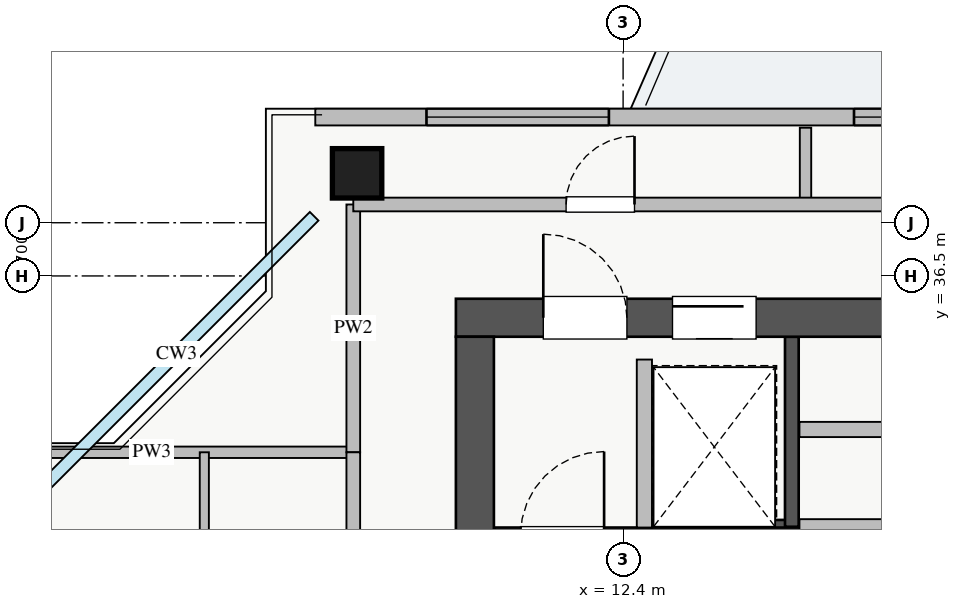
"""IFC4 building model, lengths in metres.
Left out: names, types, materials, properties, quantities, classifications, styles, units other than length and angle.
Written with IfcOpenShell. Run it as: python <this file> out.ifc"""

import sys

from ifc_helpers import new_model, si_unit, direction, frame, frame_2d, origin, origin_2d, place, context, subcontext, project, spatial, rectangle, extrude, source, transform, mapped, element, fill, save


model = new_model("IFC4")
c1 = context("Model", 3, precision=1e-05, world=origin(), true_north=direction((0.0, 1.0)))
c2 = subcontext(c1, "Body", "Model", "MODEL_VIEW")
j1 = project(units=[si_unit("LENGTHUNIT", "METRE"), si_unit("PLANEANGLEUNIT", "RADIAN")], contexts=[c1])
p1 = place(None, origin())
s1 = spatial("IfcSite", under=j1, at=p1, CompositionType="ELEMENT")
p2 = place(p1, origin())
s2 = spatial("IfcBuilding", under=s1, at=p2, CompositionType="ELEMENT")
p3 = place(p2, frame((0.0, 0.0, 260.0)))
s3 = spatial("IfcBuildingStorey", under=s2, at=p3, CompositionType="ELEMENT", Elevation=260.0)
p4 = place(p3, frame((12.68, 33.2, 0.0), z_axis=(0.0, 0.0, 1.0), x_axis=(1.0, 0.0, 0.0)))
e1 = element("IfcWall", 1, at=p4, inside=s3, PredefinedType="SHEAR", context=c2, shape_type="SweptSolid", body=[
    extrude(rectangle(XDim=1.94, YDim=0.18, at=frame_2d((0.97, 0.0))), origin(), (0.0, 0.0, 1.0), 3.03),
])
p5 = place(p3, frame((14.62, 33.2, 0.0), z_axis=(0.0, 0.0, 1.0), x_axis=(0.0, 1.0, 0.0)))
e2 = element("IfcWall", 2, at=p5, inside=s3, PredefinedType="SHEAR", context=c2, shape_type="SweptSolid", body=[
    extrude(rectangle(XDim=2.5, YDim=0.18, at=frame_2d((1.25, 0.0))), origin(), (0.0, 0.0, 1.0), 3.03),
])
p6 = place(p3, frame((10.7, 33.09, 0.0), z_axis=(0.0, 0.0, 1.0), x_axis=(1.0, 0.0, 0.0)))
e3 = element("IfcWall", 3, at=p6, inside=s3, PredefinedType="SHEAR", context=c2, shape_type="SweptSolid", body=[
    extrude(rectangle(XDim=7.45, YDim=0.2, at=frame_2d((3.725, 0.0))), origin(), (0.0, 0.0, 1.0), 3.25),
])
p7 = place(p6, frame((0.35, 0.0, 0.0)))
e4 = element("IfcOpeningElement", 4, at=p7, cuts=e3, PredefinedType="OPENING", context=c2, shape_type="SweptSolid", body=[
    extrude(rectangle(XDim=1.1, YDim=2.05, at=frame_2d((0.55, 1.025))), frame((0.0, 0.11, 0.0), z_axis=(0.0, -1.0, 0.0), x_axis=(1.0, 0.0, 0.0)), (0.0, 0.0, 1.0), 0.22),
])
p8 = place(p3, frame((10.2, 35.95, 0.0), z_axis=(0.0, 0.0, 1.0), x_axis=(1.0, 0.0, 0.0)))
e5 = element("IfcWall", 5, at=p8, inside=s3, PredefinedType="SHEAR", context=c2, shape_type="SweptSolid", body=[
    extrude(rectangle(XDim=17.6, YDim=0.5, at=frame_2d((8.8, 0.0))), origin(), (0.0, 0.0, 1.0), 3.25),
])
p9 = place(p8, frame((1.15, 0.0, 0.0)))
e6 = element("IfcOpeningElement", 6, at=p9, cuts=e5, PredefinedType="OPENING", context=c2, shape_type="SweptSolid", body=[
    extrude(rectangle(XDim=1.1, YDim=2.05, at=frame_2d((0.55, 1.025))), frame((0.0, 0.26, 0.0), z_axis=(0.0, -1.0, 0.0), x_axis=(1.0, 0.0, 0.0)), (0.0, 0.0, 1.0), 0.52),
])
p10 = place(p8, frame((8.3, 0.0, 0.0)))
e7 = element("IfcOpeningElement", 7, at=p10, cuts=e5, PredefinedType="OPENING", context=c2, shape_type="SweptSolid", body=[
    extrude(rectangle(XDim=1.1, YDim=2.05, at=frame_2d((0.55, 1.025))), frame((0.0, 0.26, 0.0), z_axis=(0.0, -1.0, 0.0), x_axis=(1.0, 0.0, 0.0)), (0.0, 0.0, 1.0), 0.52),
])
p11 = place(p8, frame((2.85, 0.0, 0.0)))
e8 = element("IfcOpeningElement", 8, at=p11, cuts=e5, PredefinedType="OPENING", context=c2, shape_type="SweptSolid", body=[
    extrude(rectangle(XDim=1.1, YDim=2.05, at=frame_2d((0.55, 1.025))), frame((0.0, 0.26, 0.0), z_axis=(0.0, -1.0, 0.0), x_axis=(1.0, 0.0, 0.0)), (0.0, 0.0, 1.0), 0.52),
])
p12 = place(p8, frame((5.8, 0.0, 0.0)))
e9 = element("IfcOpeningElement", 9, at=p12, cuts=e5, PredefinedType="OPENING", context=c2, shape_type="SweptSolid", body=[
    extrude(rectangle(XDim=1.0, YDim=2.05, at=frame_2d((0.5, 1.025))), frame((0.0, 0.26, 0.0), z_axis=(0.0, -1.0, 0.0), x_axis=(1.0, 0.0, 0.0)), (0.0, 0.0, 1.0), 0.52),
])
p13 = place(p8, frame((14.74, 0.0, 0.0)))
e10 = element("IfcOpeningElement", 10, at=p13, cuts=e5, PredefinedType="OPENING", context=c2, shape_type="SweptSolid", body=[
    extrude(rectangle(XDim=1.0, YDim=2.05, at=frame_2d((0.5, 1.025))), frame((0.0, 0.26, 0.0), z_axis=(0.0, -1.0, 0.0), x_axis=(1.0, 0.0, 0.0)), (0.0, 0.0, 1.0), 0.52),
])
p14 = place(p8, frame((10.25, 0.0, 0.0)))
e11 = element("IfcOpeningElement", 11, at=p14, cuts=e5, PredefinedType="OPENING", context=c2, shape_type="SweptSolid", body=[
    extrude(rectangle(XDim=1.0, YDim=2.05, at=frame_2d((0.5, 1.025))), frame((0.0, 0.26, 0.0), z_axis=(0.0, -1.0, 0.0), x_axis=(1.0, 0.0, 0.0)), (0.0, 0.0, 1.0), 0.52),
])
p15 = place(p8, frame((12.7, 0.0, 0.0)))
e12 = element("IfcOpeningElement", 12, at=p15, cuts=e5, PredefinedType="OPENING", context=c2, shape_type="SweptSolid", body=[
    extrude(rectangle(XDim=1.0, YDim=2.05, at=frame_2d((0.5, 1.025))), frame((0.0, 0.26, 0.0), z_axis=(0.0, -1.0, 0.0), x_axis=(1.0, 0.0, 0.0)), (0.0, 0.0, 1.0), 0.52),
])
p16 = place(p3, frame((10.45, 29.5, 0.0), z_axis=(0.0, 0.0, 1.0), x_axis=(0.0, 1.0, 0.0)))
e13 = element("IfcWall", 13, at=p16, inside=s3, PredefinedType="SHEAR", context=c2, shape_type="SweptSolid", body=[
    extrude(rectangle(XDim=6.2, YDim=0.5, at=frame_2d((3.1, 0.0))), origin(), (0.0, 0.0, 1.0), 3.25),
])
m1 = source(origin(), c2, "Body", "SweptSolid", [
    extrude(rectangle(XDim=0.65, YDim=0.65, at=origin_2d()), origin(), (0.0, 0.0, 1.0), 3.25),
])
p17 = place(p3, frame((8.9, 37.85, 0.0), z_axis=(0.0, 0.0, 1.0), x_axis=(1.0, 0.0, 0.0)))
e14 = element("IfcColumn", 14, at=p17, inside=s3, PredefinedType="COLUMN", context=c2, shape_type="MappedRepresentation", body=[
    mapped(m1, transform((0.0, 0.0, 0.0), x_axis=(1.0, 0.0, 0.0), y_axis=(0.0, 1.0, 0.0), z_axis=(0.0, 0.0, 1.0), scale=1.0)),
])
p18 = place(p3, frame((8.35, 38.59, 0.0), z_axis=(0.0, 0.0, 1.0), x_axis=(1.0, 0.0, 0.0)))
e15 = element("IfcWall", 15, at=p18, inside=s3, PredefinedType="STANDARD", context=c2, shape_type="SweptSolid", body=[
    extrude(rectangle(XDim=21.3, YDim=0.22, at=frame_2d((10.65, 0.0))), origin(), (0.0, 0.0, 1.0), 2.57),
])
p19 = place(p18, frame((11.5, 0.0, 0.0)))
e16 = element("IfcOpeningElement", 16, at=p19, cuts=e15, PredefinedType="OPENING", context=c2, shape_type="SweptSolid", body=[
    extrude(rectangle(XDim=1.2, YDim=2.1, at=frame_2d((0.6, 1.05))), frame((0.0, 0.12, 0.0), z_axis=(0.0, -1.0, 0.0), x_axis=(1.0, 0.0, 0.0)), (0.0, 0.0, 1.0), 0.24),
])
p20 = place(p18, frame((1.463, 0.0, 0.9)))
e17 = element("IfcOpeningElement", 17, at=p20, cuts=e15, PredefinedType="OPENING", context=c2, shape_type="SweptSolid", body=[
    extrude(rectangle(XDim=2.4, YDim=1.48, at=frame_2d((1.2, 0.74))), frame((0.0, 0.12, 0.0), z_axis=(0.0, -1.0, 0.0), x_axis=(1.0, 0.0, 0.0)), (0.0, 0.0, 1.0), 0.24),
])
p21 = place(p18, frame((7.088, 0.0, 0.9)))
e18 = element("IfcOpeningElement", 18, at=p21, cuts=e15, PredefinedType="OPENING", context=c2, shape_type="SweptSolid", body=[
    extrude(rectangle(XDim=1.8, YDim=1.45, at=frame_2d((0.9, 0.725))), frame((0.0, 0.12, 0.0), z_axis=(0.0, -1.0, 0.0), x_axis=(1.0, 0.0, 0.0)), (0.0, 0.0, 1.0), 0.24),
])
p22 = place(p18, frame((19.775, 0.0, 0.9)))
e19 = element("IfcOpeningElement", 19, at=p22, cuts=e15, PredefinedType="OPENING", context=c2, shape_type="SweptSolid", body=[
    extrude(rectangle(XDim=1.2, YDim=1.4, at=frame_2d((0.6, 0.7))), frame((0.0, 0.12, 0.0), z_axis=(0.0, -1.0, 0.0), x_axis=(1.0, 0.0, 0.0)), (0.0, 0.0, 1.0), 0.24),
])
p23 = place(p18, frame((15.042, 0.0, 0.9)))
e20 = element("IfcOpeningElement", 20, at=p23, cuts=e15, PredefinedType="OPENING", context=c2, shape_type="SweptSolid", body=[
    extrude(rectangle(XDim=2.4, YDim=1.5, at=frame_2d((1.2, 0.75))), frame((0.0, 0.12, 0.0), z_axis=(0.0, -1.0, 0.0), x_axis=(1.0, 0.0, 0.0)), (0.0, 0.0, 1.0), 0.24),
])
p24 = place(p3, frame((12.68, 33.19, 0.0), z_axis=(0.0, 0.0, 1.0), x_axis=(0.0, 1.0, 0.0)))
e21 = element("IfcWall", 21, at=p24, inside=s3, PredefinedType="PARTITIONING", context=c2, shape_type="SweptSolid", body=[
    extrude(rectangle(XDim=2.21, YDim=0.2, at=frame_2d((1.105, 0.0))), origin(), (0.0, 0.0, 1.0), 3.03),
])
p25 = place(p3, frame((14.72, 34.48, 0.0), z_axis=(0.0, 0.0, 1.0), x_axis=(1.0, 0.0, 0.0)))
e22 = element("IfcWall", 22, at=p25, inside=s3, PredefinedType="PARTITIONING", context=c2, shape_type="SweptSolid", body=[
    extrude(rectangle(XDim=3.28, YDim=0.2, at=frame_2d((1.64, 0.0))), origin(), (0.0, 0.0, 1.0), 3.03),
])
p26 = place(p25, frame((1.15, 0.0, 0.0)))
e23 = element("IfcOpeningElement", 23, at=p26, cuts=e22, PredefinedType="OPENING", context=c2, shape_type="SweptSolid", body=[
    extrude(rectangle(XDim=0.9, YDim=2.05, at=frame_2d((0.45, 1.025))), frame((0.0, 0.11, 0.0), z_axis=(0.0, -1.0, 0.0), x_axis=(1.0, 0.0, 0.0)), (0.0, 0.0, 1.0), 0.22),
])
p27 = place(p3, frame((14.72, 33.2, 0.0), z_axis=(0.0, 0.0, 1.0), x_axis=(1.0, 0.0, 0.0)))
e24 = element("IfcWall", 24, at=p27, inside=s3, PredefinedType="PARTITIONING", context=c2, shape_type="SweptSolid", body=[
    extrude(rectangle(XDim=3.28, YDim=0.2, at=frame_2d((1.64, 0.0))), origin(), (0.0, 0.0, 1.0), 3.03),
])
p28 = place(p3, frame((3.55, 34.18, 0.0), z_axis=(0.0, 0.0, 1.0), x_axis=(1.0, 0.0, 0.0)))
e25 = element("IfcWall", 25, at=p28, inside=s3, PredefinedType="PARTITIONING", context=c2, shape_type="SweptSolid", body=[
    extrude(rectangle(XDim=5.3, YDim=0.15, at=frame_2d((2.65, 0.0))), origin(), (0.0, 0.0, 1.0), 3.03),
])
p29 = place(p3, frame((8.85, 34.18, 0.0), z_axis=(0.0, 0.0, 1.0), x_axis=(0.0, 1.0, 0.0)))
e26 = element("IfcWall", 26, at=p29, inside=s3, PredefinedType="PARTITIONING", context=c2, shape_type="SweptSolid", body=[
    extrude(rectangle(XDim=3.26, YDim=0.18, at=frame_2d((1.63, 0.0))), origin(), (0.0, 0.0, 1.0), 2.529),
])
p30 = place(p3, frame((14.8, 37.44, 0.0), z_axis=(0.0, 0.0, 1.0), x_axis=(0.0, 1.0, 0.0)))
e27 = element("IfcWall", 27, at=p30, inside=s3, PredefinedType="PARTITIONING", context=c2, shape_type="SweptSolid", body=[
    extrude(rectangle(XDim=1.01, YDim=0.15, at=frame_2d((0.505, 0.0))), origin(), (0.0, 0.0, 1.0), 3.03),
])
p31 = place(p3, frame((8.85, 37.44, 0.0), z_axis=(0.0, 0.0, 1.0), x_axis=(1.0, 0.0, 0.0)))
e28 = element("IfcWall", 28, at=p31, inside=s3, PredefinedType="PARTITIONING", context=c2, shape_type="SweptSolid", body=[
    extrude(rectangle(XDim=18.95, YDim=0.18, at=frame_2d((9.475, 0.0))), origin(), (0.0, 0.0, 1.0), 3.03),
])
p32 = place(p31, frame((2.8, 0.0, 0.0)))
e29 = element("IfcOpeningElement", 29, at=p32, cuts=e28, PredefinedType="OPENING", context=c2, shape_type="SweptSolid", body=[
    extrude(rectangle(XDim=0.9, YDim=2.05, at=frame_2d((0.45, 1.025))), frame((0.0, 0.1, 0.0), z_axis=(0.0, -1.0, 0.0), x_axis=(1.0, 0.0, 0.0)), (0.0, 0.0, 1.0), 0.2),
])
p33 = place(p31, frame((8.8, 0.0, 0.0)))
e30 = element("IfcOpeningElement", 30, at=p33, cuts=e28, PredefinedType="OPENING", context=c2, shape_type="SweptSolid", body=[
    extrude(rectangle(XDim=0.9, YDim=2.05, at=frame_2d((0.45, 1.025))), frame((0.0, 0.1, 0.0), z_axis=(0.0, -1.0, 0.0), x_axis=(1.0, 0.0, 0.0)), (0.0, 0.0, 1.0), 0.2),
])
p34 = place(p31, frame((15.2, 0.0, 0.0)))
e31 = element("IfcOpeningElement", 31, at=p34, cuts=e28, PredefinedType="OPENING", context=c2, shape_type="SweptSolid", body=[
    extrude(rectangle(XDim=0.9, YDim=2.05, at=frame_2d((0.45, 1.025))), frame((0.0, 0.1, 0.0), z_axis=(0.0, -1.0, 0.0), x_axis=(1.0, 0.0, 0.0)), (0.0, 0.0, 1.0), 0.2),
])
p35 = place(p3, frame((6.89, 30.75, 0.0), z_axis=(0.0, 0.0, 1.0), x_axis=(0.0, 1.0, 0.0)))
e32 = element("IfcWall", 32, at=p35, inside=s3, PredefinedType="PLUMBINGWALL", context=c2, shape_type="SweptSolid", body=[
    extrude(rectangle(XDim=3.43, YDim=0.12, at=frame_2d((1.715, 0.0))), origin(), (0.0, 0.0, 1.0), 3.03),
])
p36 = place(p3, frame((8.85, 11.82, 0.0), z_axis=(0.0, 0.0, 1.0), x_axis=(0.0, 1.0, 0.0)))
e33 = element("IfcWall", 33, at=p36, inside=s3, PredefinedType="PARTITIONING", context=c2, shape_type="SweptSolid", body=[
    extrude(rectangle(XDim=22.36, YDim=0.18, at=frame_2d((11.18, 0.0))), origin(), (0.0, 0.0, 1.0), 2.529),
])
p37 = place(p36, frame((1.2, 0.0, 0.0)))
e34 = element("IfcOpeningElement", 34, at=p37, cuts=e33, PredefinedType="OPENING", context=c2, shape_type="SweptSolid", body=[
    extrude(rectangle(XDim=1.0, YDim=2.05, at=frame_2d((0.5, 1.025))), frame((0.0, 0.1, 0.0), z_axis=(0.0, -1.0, 0.0), x_axis=(1.0, 0.0, 0.0)), (0.0, 0.0, 1.0), 0.2),
])
p38 = place(p36, frame((8.445, 0.0, 0.0)))
e35 = element("IfcOpeningElement", 35, at=p38, cuts=e33, PredefinedType="OPENING", context=c2, shape_type="SweptSolid", body=[
    extrude(rectangle(XDim=1.0, YDim=2.05, at=frame_2d((0.5, 1.025))), frame((0.0, 0.1, 0.0), z_axis=(0.0, -1.0, 0.0), x_axis=(1.0, 0.0, 0.0)), (0.0, 0.0, 1.0), 0.2),
])
p39 = place(p36, frame((16.23, 0.0, 0.0)))
e36 = element("IfcOpeningElement", 36, at=p39, cuts=e33, PredefinedType="OPENING", context=c2, shape_type="SweptSolid", body=[
    extrude(rectangle(XDim=1.0, YDim=2.05, at=frame_2d((0.5, 1.025))), frame((0.0, 0.1, 0.0), z_axis=(0.0, -1.0, 0.0), x_axis=(1.0, 0.0, 0.0)), (0.0, 0.0, 1.0), 0.2),
])
m2 = source(origin(), c2, "Body", "SweptSolid", [
    extrude(rectangle(XDim=2.4, YDim=1.48, at=frame_2d((1.2, 0.74))), frame((0.0, 0.03, 0.0), z_axis=(0.0, -1.0, 0.0), x_axis=(1.0, 0.0, 0.0)), (0.0, 0.0, 1.0), 0.06),
])
p40 = place(p20, origin())
e37 = element("IfcWindow", 37, at=p40, inside=s3, PartitioningType="TRIPLE_PANEL_VERTICAL", PredefinedType="WINDOW", context=c2, shape_type="MappedRepresentation", body=[
    mapped(m2, transform((0.0, 0.0, 0.0), x_axis=(1.0, 0.0, 0.0), y_axis=(0.0, 1.0, 0.0), z_axis=(0.0, 0.0, 1.0), scale=1.0)),
])
fill(e17, e37)
m3 = source(origin(), c2, "Body", "SweptSolid", [
    extrude(rectangle(XDim=1.8, YDim=1.45, at=frame_2d((0.9, 0.725))), frame((0.0, 0.03, 0.0), z_axis=(0.0, -1.0, 0.0), x_axis=(1.0, 0.0, 0.0)), (0.0, 0.0, 1.0), 0.06),
])
p41 = place(p21, origin())
e38 = element("IfcWindow", 38, at=p41, inside=s3, PartitioningType="DOUBLE_PANEL_VERTICAL", PredefinedType="WINDOW", context=c2, shape_type="MappedRepresentation", body=[
    mapped(m3, transform((0.0, 0.0, 0.0), x_axis=(1.0, 0.0, 0.0), y_axis=(0.0, 1.0, 0.0), z_axis=(0.0, 0.0, 1.0), scale=1.0)),
])
fill(e18, e38)
m4 = source(origin(), c2, "Body", "SweptSolid", [
    extrude(rectangle(XDim=1.1, YDim=2.05, at=frame_2d((0.55, 1.025))), frame((0.0, 0.025, 0.0), z_axis=(0.0, -1.0, 0.0), x_axis=(1.0, 0.0, 0.0)), (0.0, 0.0, 1.0), 0.05),
])
p42 = place(p9, origin())
e39 = element("IfcDoor", 39, at=p42, inside=s3, OperationType="SINGLE_SWING_LEFT", PredefinedType="DOOR", context=c2, shape_type="MappedRepresentation", body=[
    mapped(m4, transform((0.0, 0.0, 0.0), x_axis=(1.0, 0.0, 0.0), y_axis=(0.0, 1.0, 0.0), z_axis=(0.0, 0.0, 1.0), scale=1.0)),
])
fill(e6, e39)
p43 = place(p11, origin())
e40 = element("IfcDoor", 40, at=p43, inside=s3, OperationType="SLIDING_TO_LEFT", PredefinedType="DOOR", context=c2, shape_type="MappedRepresentation", body=[
    mapped(m4, transform((0.0, 0.0, 0.0), x_axis=(1.0, 0.0, 0.0), y_axis=(0.0, 1.0, 0.0), z_axis=(0.0, 0.0, 1.0), scale=1.0)),
])
fill(e8, e40)
m5 = source(origin(), c2, "Body", "SweptSolid", [
    extrude(rectangle(XDim=0.9, YDim=2.05, at=frame_2d((0.45, 1.025))), frame((0.0, 0.025, 0.0), z_axis=(0.0, -1.0, 0.0), x_axis=(1.0, 0.0, 0.0)), (0.0, 0.0, 1.0), 0.05),
])
p44 = place(p32, origin())
e41 = element("IfcDoor", 41, at=p44, inside=s3, OperationType="SINGLE_SWING_RIGHT", PredefinedType="DOOR", context=c2, shape_type="MappedRepresentation", body=[
    mapped(m5, transform((0.0, 0.0, 0.0), x_axis=(1.0, 0.0, 0.0), y_axis=(0.0, 1.0, 0.0), z_axis=(0.0, 0.0, 1.0), scale=1.0)),
])
fill(e29, e41)
save(model, sys.argv[1])
